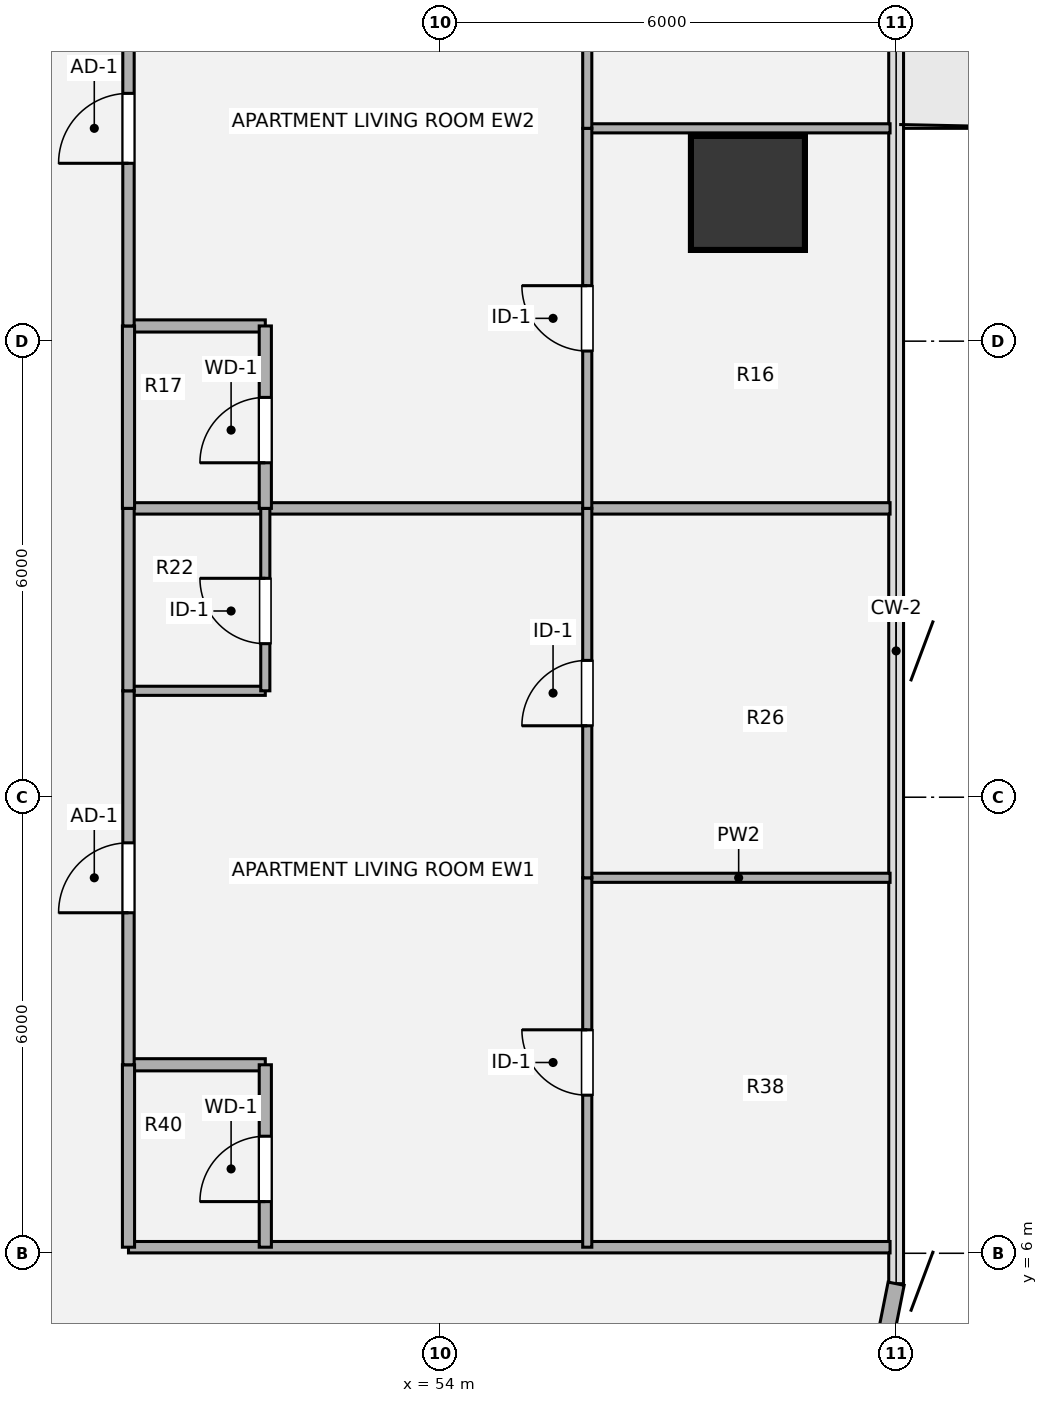
"""IFC4 building model, lengths in metres.
Left out: names, types, materials, properties, quantities, classifications, styles, units other than length and angle.
Written with IfcOpenShell. Run it as: python <this file> out.ifc"""

import sys

from ifc_helpers import new_model, si_unit, direction, frame, frame_2d, origin, origin_2d, place, context, subcontext, project, spatial, rectangle, hollow_circle, extrude, source, transform, mapped, element, fill, save


model = new_model("IFC4")
c1 = context("Model", 3, precision=1e-05, world=origin(), true_north=direction((0.0, 1.0)))
c2 = subcontext(c1, "Body", "Model", "MODEL_VIEW")
j1 = project(units=[si_unit("LENGTHUNIT", "METRE"), si_unit("PLANEANGLEUNIT", "RADIAN")], contexts=[c1])
p1 = place(None, origin())
s1 = spatial("IfcSite", under=j1, at=p1, CompositionType="ELEMENT")
p2 = place(p1, origin())
s2 = spatial("IfcBuilding", under=s1, at=p2, CompositionType="ELEMENT")
p3 = place(p2, frame((0.0, 0.0, 72.36)))
s3 = spatial("IfcBuildingStorey", under=s2, at=p3, CompositionType="ELEMENT", Elevation=72.36)
m1 = source(origin(), c2, "Body", "SweptSolid", [
    extrude(hollow_circle(Radius=0.75, WallThickness=0.05, at=origin_2d()), origin(), (0.0, 0.0, 1.0), 3.78),
])
p4 = place(p3, frame((58.05, 19.95, 0.0), z_axis=(0.0, 0.0, 1.0), x_axis=(1.0, 0.0, 0.0)))
e1 = element("IfcColumn", 1, at=p4, inside=s3, PredefinedType="COLUMN", context=c2, shape_type="MappedRepresentation", body=[
    mapped(m1, transform((0.0, 0.0, 0.0), x_axis=(1.0, 0.0, 0.0), y_axis=(0.0, 1.0, 0.0), z_axis=(0.0, 0.0, 1.0), scale=1.0)),
])
p5 = place(p3, frame((60.0, 5.6, 0.0), z_axis=(0.0, 0.0, 1.0), x_axis=(-0.195138390419, -0.980775717779, 0.0)))
e2 = element("IfcWall", 2, at=p5, inside=s3, PredefinedType="SOLIDWALL", context=c2, shape_type="SweptSolid", body=[
    extrude(rectangle(XDim=1.249, YDim=0.215, at=frame_2d((0.624, 0.0))), origin(), (0.0, 0.0, 1.0), 3.53),
])
p6 = place(p3, frame((49.9, 6.08, 0.0), z_axis=(0.0, 0.0, 1.0), x_axis=(1.0, 0.0, 0.0)))
e3 = element("IfcWall", 3, at=p6, inside=s3, PredefinedType="PARTITIONING", context=c2, shape_type="SweptSolid", body=[
    extrude(rectangle(XDim=10.02, YDim=0.15, at=frame_2d((5.01, 0.0))), origin(), (0.0, 0.0, 1.0), 3.5),
])
p7 = place(p3, frame((49.9, 8.48, 0.0), z_axis=(0.0, 0.0, 1.0), x_axis=(1.0, 0.0, 0.0)))
e4 = element("IfcWall", 4, at=p7, inside=s3, PredefinedType="PLUMBINGWALL", context=c2, shape_type="SweptSolid", body=[
    extrude(rectangle(XDim=1.8, YDim=0.16, at=frame_2d((0.9, 0.0))), origin(), (0.0, 0.0, 1.0), 3.5),
])
p8 = place(p3, frame((55.936, 10.94, 0.0), z_axis=(0.0, 0.0, 1.0), x_axis=(1.0, 0.0, 0.0)))
e5 = element("IfcWall", 5, at=p8, inside=s3, PredefinedType="PARTITIONING", context=c2, shape_type="SweptSolid", body=[
    extrude(rectangle(XDim=3.984, YDim=0.12, at=frame_2d((1.992, 0.0))), origin(), (0.0, 0.0, 1.0), 3.5),
])
p9 = place(p3, frame((49.9, 13.4, 0.0), z_axis=(0.0, 0.0, 1.0), x_axis=(1.0, 0.0, 0.0)))
e6 = element("IfcWall", 6, at=p9, inside=s3, PredefinedType="PARTITIONING", context=c2, shape_type="SweptSolid", body=[
    extrude(rectangle(XDim=1.8, YDim=0.12, at=frame_2d((0.9, 0.0))), origin(), (0.0, 0.0, 1.0), 3.5),
])
p10 = place(p3, frame((49.9, 15.8, 0.0), z_axis=(0.0, 0.0, 1.0), x_axis=(1.0, 0.0, 0.0)))
e7 = element("IfcWall", 7, at=p10, inside=s3, PredefinedType="PARTITIONING", context=c2, shape_type="SweptSolid", body=[
    extrude(rectangle(XDim=10.02, YDim=0.15, at=frame_2d((5.01, 0.0))), origin(), (0.0, 0.0, 1.0), 3.5),
])
p11 = place(p3, frame((49.9, 18.2, 0.0), z_axis=(0.0, 0.0, 1.0), x_axis=(1.0, 0.0, 0.0)))
e8 = element("IfcWall", 8, at=p11, inside=s3, PredefinedType="PLUMBINGWALL", context=c2, shape_type="SweptSolid", body=[
    extrude(rectangle(XDim=1.8, YDim=0.16, at=frame_2d((0.9, 0.0))), origin(), (0.0, 0.0, 1.0), 2.715),
])
p12 = place(p3, frame((55.936, 20.8, 0.0), z_axis=(0.0, 0.0, 1.0), x_axis=(1.0, 0.0, 0.0)))
e9 = element("IfcWall", 9, at=p12, inside=s3, PredefinedType="PARTITIONING", context=c2, shape_type="SweptSolid", body=[
    extrude(rectangle(XDim=3.984, YDim=0.12, at=frame_2d((1.992, 0.0))), origin(), (0.0, 0.0, 1.0), 3.055),
])
p13 = place(p3, frame((49.9, 6.08, 0.0), z_axis=(0.0, 0.0, 1.0), x_axis=(0.0, 1.0, 0.0)))
e10 = element("IfcWall", 10, at=p13, inside=s3, PredefinedType="PLUMBINGWALL", context=c2, shape_type="SweptSolid", body=[
    extrude(rectangle(XDim=2.4, YDim=0.16, at=frame_2d((1.2, 0.0))), origin(), (0.0, 0.0, 1.0), 3.5),
])
p14 = place(p3, frame((49.9, 8.48, 0.0), z_axis=(0.0, 0.0, 1.0), x_axis=(0.0, 1.0, 0.0)))
e11 = element("IfcWall", 11, at=p14, inside=s3, PredefinedType="PARTITIONING", context=c2, shape_type="SweptSolid", body=[
    extrude(rectangle(XDim=4.92, YDim=0.15, at=frame_2d((2.46, 0.0))), origin(), (0.0, 0.0, 1.0), 3.5),
])
p15 = place(p14, frame((2.0, 0.0, 0.0)))
e12 = element("IfcOpeningElement", 12, at=p15, cuts=e11, PredefinedType="OPENING", context=c2, shape_type="SweptSolid", body=[
    extrude(rectangle(XDim=0.92, YDim=2.1, at=origin_2d()), frame((0.46, 0.085, 1.05), z_axis=(0.0, -1.0, 0.0), x_axis=(1.0, 0.0, 0.0)), (0.0, 0.0, 1.0), 0.17),
])
p16 = place(p3, frame((49.9, 13.4, 0.0), z_axis=(0.0, 0.0, 1.0), x_axis=(0.0, 1.0, 0.0)))
e13 = element("IfcWall", 13, at=p16, inside=s3, PredefinedType="PARTITIONING", context=c2, shape_type="SweptSolid", body=[
    extrude(rectangle(XDim=2.4, YDim=0.15, at=frame_2d((1.2, 0.0))), origin(), (0.0, 0.0, 1.0), 3.5),
])
p17 = place(p3, frame((49.9, 15.8, 0.0), z_axis=(0.0, 0.0, 1.0), x_axis=(0.0, 1.0, 0.0)))
e14 = element("IfcWall", 14, at=p17, inside=s3, PredefinedType="PLUMBINGWALL", context=c2, shape_type="SweptSolid", body=[
    extrude(rectangle(XDim=2.4, YDim=0.16, at=frame_2d((1.2, 0.0))), origin(), (0.0, 0.0, 1.0), 3.5),
])
p18 = place(p3, frame((49.9, 18.2, 0.0), z_axis=(0.0, 0.0, 1.0), x_axis=(0.0, 1.0, 0.0)))
e15 = element("IfcWall", 15, at=p18, inside=s3, PredefinedType="PARTITIONING", context=c2, shape_type="SweptSolid", body=[
    extrude(rectangle(XDim=5.2, YDim=0.15, at=frame_2d((2.6, 0.0))), origin(), (0.0, 0.0, 1.0), 3.5),
])
p19 = place(p18, frame((2.14, 0.0, 0.0)))
e16 = element("IfcOpeningElement", 16, at=p19, cuts=e15, PredefinedType="OPENING", context=c2, shape_type="SweptSolid", body=[
    extrude(rectangle(XDim=0.92, YDim=2.1, at=origin_2d()), frame((0.46, 0.085, 1.05), z_axis=(0.0, -1.0, 0.0), x_axis=(1.0, 0.0, 0.0)), (0.0, 0.0, 1.0), 0.17),
])
p20 = place(p3, frame((51.7, 6.08, 0.0), z_axis=(0.0, 0.0, 1.0), x_axis=(0.0, 1.0, 0.0)))
e17 = element("IfcWall", 17, at=p20, inside=s3, PredefinedType="PLUMBINGWALL", context=c2, shape_type="SweptSolid", body=[
    extrude(rectangle(XDim=2.4, YDim=0.16, at=frame_2d((1.2, 0.0))), origin(), (0.0, 0.0, 1.0), 3.5),
])
p21 = place(p20, frame((0.6, 0.0, 0.0)))
e18 = element("IfcOpeningElement", 18, at=p21, cuts=e17, PredefinedType="OPENING", context=c2, shape_type="SweptSolid", body=[
    extrude(rectangle(XDim=0.86, YDim=2.1, at=origin_2d()), frame((0.43, 0.09, 1.05), z_axis=(0.0, -1.0, 0.0), x_axis=(1.0, 0.0, 0.0)), (0.0, 0.0, 1.0), 0.18),
])
p22 = place(p3, frame((51.7, 13.4, 0.0), z_axis=(0.0, 0.0, 1.0), x_axis=(0.0, 1.0, 0.0)))
e19 = element("IfcWall", 19, at=p22, inside=s3, PredefinedType="PARTITIONING", context=c2, shape_type="SweptSolid", body=[
    extrude(rectangle(XDim=2.4, YDim=0.12, at=frame_2d((1.2, 0.0))), origin(), (0.0, 0.0, 1.0), 3.5),
])
p23 = place(p22, frame((0.62, 0.0, 0.0)))
e20 = element("IfcOpeningElement", 20, at=p23, cuts=e19, PredefinedType="OPENING", context=c2, shape_type="SweptSolid", body=[
    extrude(rectangle(XDim=0.86, YDim=2.1, at=origin_2d()), frame((0.43, 0.07, 1.05), z_axis=(0.0, -1.0, 0.0), x_axis=(1.0, 0.0, 0.0)), (0.0, 0.0, 1.0), 0.14),
])
p24 = place(p3, frame((51.7, 15.8, 0.0), z_axis=(0.0, 0.0, 1.0), x_axis=(0.0, 1.0, 0.0)))
e21 = element("IfcWall", 21, at=p24, inside=s3, PredefinedType="PLUMBINGWALL", context=c2, shape_type="SweptSolid", body=[
    extrude(rectangle(XDim=2.4, YDim=0.16, at=frame_2d((1.2, 0.0))), origin(), (0.0, 0.0, 1.0), 3.5),
])
p25 = place(p24, frame((0.6, 0.0, 0.0)))
e22 = element("IfcOpeningElement", 22, at=p25, cuts=e21, PredefinedType="OPENING", context=c2, shape_type="SweptSolid", body=[
    extrude(rectangle(XDim=0.86, YDim=2.1, at=origin_2d()), frame((0.43, 0.09, 1.05), z_axis=(0.0, -1.0, 0.0), x_axis=(1.0, 0.0, 0.0)), (0.0, 0.0, 1.0), 0.18),
])
p26 = place(p3, frame((55.936, 6.08, 0.0), z_axis=(0.0, 0.0, 1.0), x_axis=(0.0, 1.0, 0.0)))
e23 = element("IfcWall", 23, at=p26, inside=s3, PredefinedType="PARTITIONING", context=c2, shape_type="SweptSolid", body=[
    extrude(rectangle(XDim=4.86, YDim=0.12, at=frame_2d((2.43, 0.0))), origin(), (0.0, 0.0, 1.0), 3.5),
])
p27 = place(p26, frame((2.0, 0.0, 0.0)))
e24 = element("IfcOpeningElement", 24, at=p27, cuts=e23, PredefinedType="OPENING", context=c2, shape_type="SweptSolid", body=[
    extrude(rectangle(XDim=0.86, YDim=2.1, at=origin_2d()), frame((0.43, 0.07, 1.05), z_axis=(0.0, -1.0, 0.0), x_axis=(1.0, 0.0, 0.0)), (0.0, 0.0, 1.0), 0.14),
])
p28 = place(p3, frame((55.936, 10.94, 0.0), z_axis=(0.0, 0.0, 1.0), x_axis=(0.0, 1.0, 0.0)))
e25 = element("IfcWall", 25, at=p28, inside=s3, PredefinedType="PARTITIONING", context=c2, shape_type="SweptSolid", body=[
    extrude(rectangle(XDim=4.86, YDim=0.12, at=frame_2d((2.43, 0.0))), origin(), (0.0, 0.0, 1.0), 3.5),
])
p29 = place(p28, frame((2.0, 0.0, 0.0)))
e26 = element("IfcOpeningElement", 26, at=p29, cuts=e25, PredefinedType="OPENING", context=c2, shape_type="SweptSolid", body=[
    extrude(rectangle(XDim=0.86, YDim=2.1, at=origin_2d()), frame((0.43, 0.07, 1.05), z_axis=(0.0, -1.0, 0.0), x_axis=(1.0, 0.0, 0.0)), (0.0, 0.0, 1.0), 0.14),
])
p30 = place(p3, frame((55.936, 15.8, 0.0), z_axis=(0.0, 0.0, 1.0), x_axis=(0.0, 1.0, 0.0)))
e27 = element("IfcWall", 27, at=p30, inside=s3, PredefinedType="PARTITIONING", context=c2, shape_type="SweptSolid", body=[
    extrude(rectangle(XDim=5.0, YDim=0.12, at=frame_2d((2.5, 0.0))), origin(), (0.0, 0.0, 1.0), 3.5),
])
p31 = place(p30, frame((2.07, 0.0, 0.0)))
e28 = element("IfcOpeningElement", 28, at=p31, cuts=e27, PredefinedType="OPENING", context=c2, shape_type="SweptSolid", body=[
    extrude(rectangle(XDim=0.86, YDim=2.1, at=origin_2d()), frame((0.43, 0.07, 1.05), z_axis=(0.0, -1.0, 0.0), x_axis=(1.0, 0.0, 0.0)), (0.0, 0.0, 1.0), 0.14),
])
p32 = place(p3, frame((55.936, 20.8, 0.0), z_axis=(0.0, 0.0, 1.0), x_axis=(0.0, 1.0, 0.0)))
e29 = element("IfcWall", 29, at=p32, inside=s3, PredefinedType="PARTITIONING", context=c2, shape_type="SweptSolid", body=[
    extrude(rectangle(XDim=5.0, YDim=0.12, at=frame_2d((2.5, 0.0))), origin(), (0.0, 0.0, 1.0), 3.5),
])
p33 = place(p32, frame((2.07, 0.0, 0.0)))
e30 = element("IfcOpeningElement", 30, at=p33, cuts=e29, PredefinedType="OPENING", context=c2, shape_type="SweptSolid", body=[
    extrude(rectangle(XDim=0.86, YDim=2.1, at=origin_2d()), frame((0.43, 0.07, 1.05), z_axis=(0.0, -1.0, 0.0), x_axis=(1.0, 0.0, 0.0)), (0.0, 0.0, 1.0), 0.14),
])
m2 = source(origin(), c2, "Body", "SweptSolid", [
    extrude(rectangle(XDim=0.92, YDim=2.1, at=origin_2d()), frame((0.46, 0.025, 1.05), z_axis=(0.0, -1.0, 0.0), x_axis=(1.0, 0.0, 0.0)), (0.0, 0.0, 1.0), 0.05),
])
p34 = place(p15, origin())
e31 = element("IfcDoor", 31, at=p34, inside=s3, OperationType="SINGLE_SWING_LEFT", PredefinedType="DOOR", context=c2, shape_type="MappedRepresentation", body=[
    mapped(m2, transform((0.0, 0.0, 0.0), x_axis=(1.0, 0.0, 0.0), y_axis=(0.0, 1.0, 0.0), z_axis=(0.0, 0.0, 1.0), scale=1.0)),
])
fill(e12, e31)
p35 = place(p19, origin())
e32 = element("IfcDoor", 32, at=p35, inside=s3, OperationType="SINGLE_SWING_LEFT", PredefinedType="DOOR", context=c2, shape_type="MappedRepresentation", body=[
    mapped(m2, transform((0.0, 0.0, 0.0), x_axis=(1.0, 0.0, 0.0), y_axis=(0.0, 1.0, 0.0), z_axis=(0.0, 0.0, 1.0), scale=1.0)),
])
fill(e16, e32)
m3 = source(origin(), c2, "Body", "SweptSolid", [
    extrude(rectangle(XDim=0.86, YDim=2.1, at=origin_2d()), frame((0.43, 0.025, 1.05), z_axis=(0.0, -1.0, 0.0), x_axis=(1.0, 0.0, 0.0)), (0.0, 0.0, 1.0), 0.05),
])
p36 = place(p21, origin())
e33 = element("IfcDoor", 33, at=p36, inside=s3, OperationType="SINGLE_SWING_LEFT", PredefinedType="DOOR", context=c2, shape_type="MappedRepresentation", body=[
    mapped(m3, transform((0.0, 0.0, 0.0), x_axis=(1.0, 0.0, 0.0), y_axis=(0.0, 1.0, 0.0), z_axis=(0.0, 0.0, 1.0), scale=1.0)),
])
fill(e18, e33)
m4 = source(origin(), c2, "Body", "SweptSolid", [
    extrude(rectangle(XDim=0.86, YDim=2.1, at=origin_2d()), frame((0.43, 0.025, 1.05), z_axis=(0.0, -1.0, 0.0), x_axis=(1.0, 0.0, 0.0)), (0.0, 0.0, 1.0), 0.05),
])
p37 = place(p23, origin())
e34 = element("IfcDoor", 34, at=p37, inside=s3, OperationType="SINGLE_SWING_RIGHT", PredefinedType="DOOR", context=c2, shape_type="MappedRepresentation", body=[
    mapped(m4, transform((0.0, 0.0, 0.0), x_axis=(1.0, 0.0, 0.0), y_axis=(0.0, 1.0, 0.0), z_axis=(0.0, 0.0, 1.0), scale=1.0)),
])
fill(e20, e34)
p38 = place(p25, origin())
e35 = element("IfcDoor", 35, at=p38, inside=s3, OperationType="SINGLE_SWING_LEFT", PredefinedType="DOOR", context=c2, shape_type="MappedRepresentation", body=[
    mapped(m3, transform((0.0, 0.0, 0.0), x_axis=(1.0, 0.0, 0.0), y_axis=(0.0, 1.0, 0.0), z_axis=(0.0, 0.0, 1.0), scale=1.0)),
])
fill(e22, e35)
p39 = place(p27, origin())
e36 = element("IfcDoor", 36, at=p39, inside=s3, OperationType="SINGLE_SWING_RIGHT", PredefinedType="DOOR", context=c2, shape_type="MappedRepresentation", body=[
    mapped(m4, transform((0.0, 0.0, 0.0), x_axis=(1.0, 0.0, 0.0), y_axis=(0.0, 1.0, 0.0), z_axis=(0.0, 0.0, 1.0), scale=1.0)),
])
fill(e24, e36)
p40 = place(p29, origin())
e37 = element("IfcDoor", 37, at=p40, inside=s3, OperationType="SINGLE_SWING_LEFT", PredefinedType="DOOR", context=c2, shape_type="MappedRepresentation", body=[
    mapped(m4, transform((0.0, 0.0, 0.0), x_axis=(1.0, 0.0, 0.0), y_axis=(0.0, 1.0, 0.0), z_axis=(0.0, 0.0, 1.0), scale=1.0)),
])
fill(e26, e37)
p41 = place(p31, origin())
e38 = element("IfcDoor", 38, at=p41, inside=s3, OperationType="SINGLE_SWING_RIGHT", PredefinedType="DOOR", context=c2, shape_type="MappedRepresentation", body=[
    mapped(m4, transform((0.0, 0.0, 0.0), x_axis=(1.0, 0.0, 0.0), y_axis=(0.0, 1.0, 0.0), z_axis=(0.0, 0.0, 1.0), scale=1.0)),
])
fill(e28, e38)
save(model, sys.argv[1])
